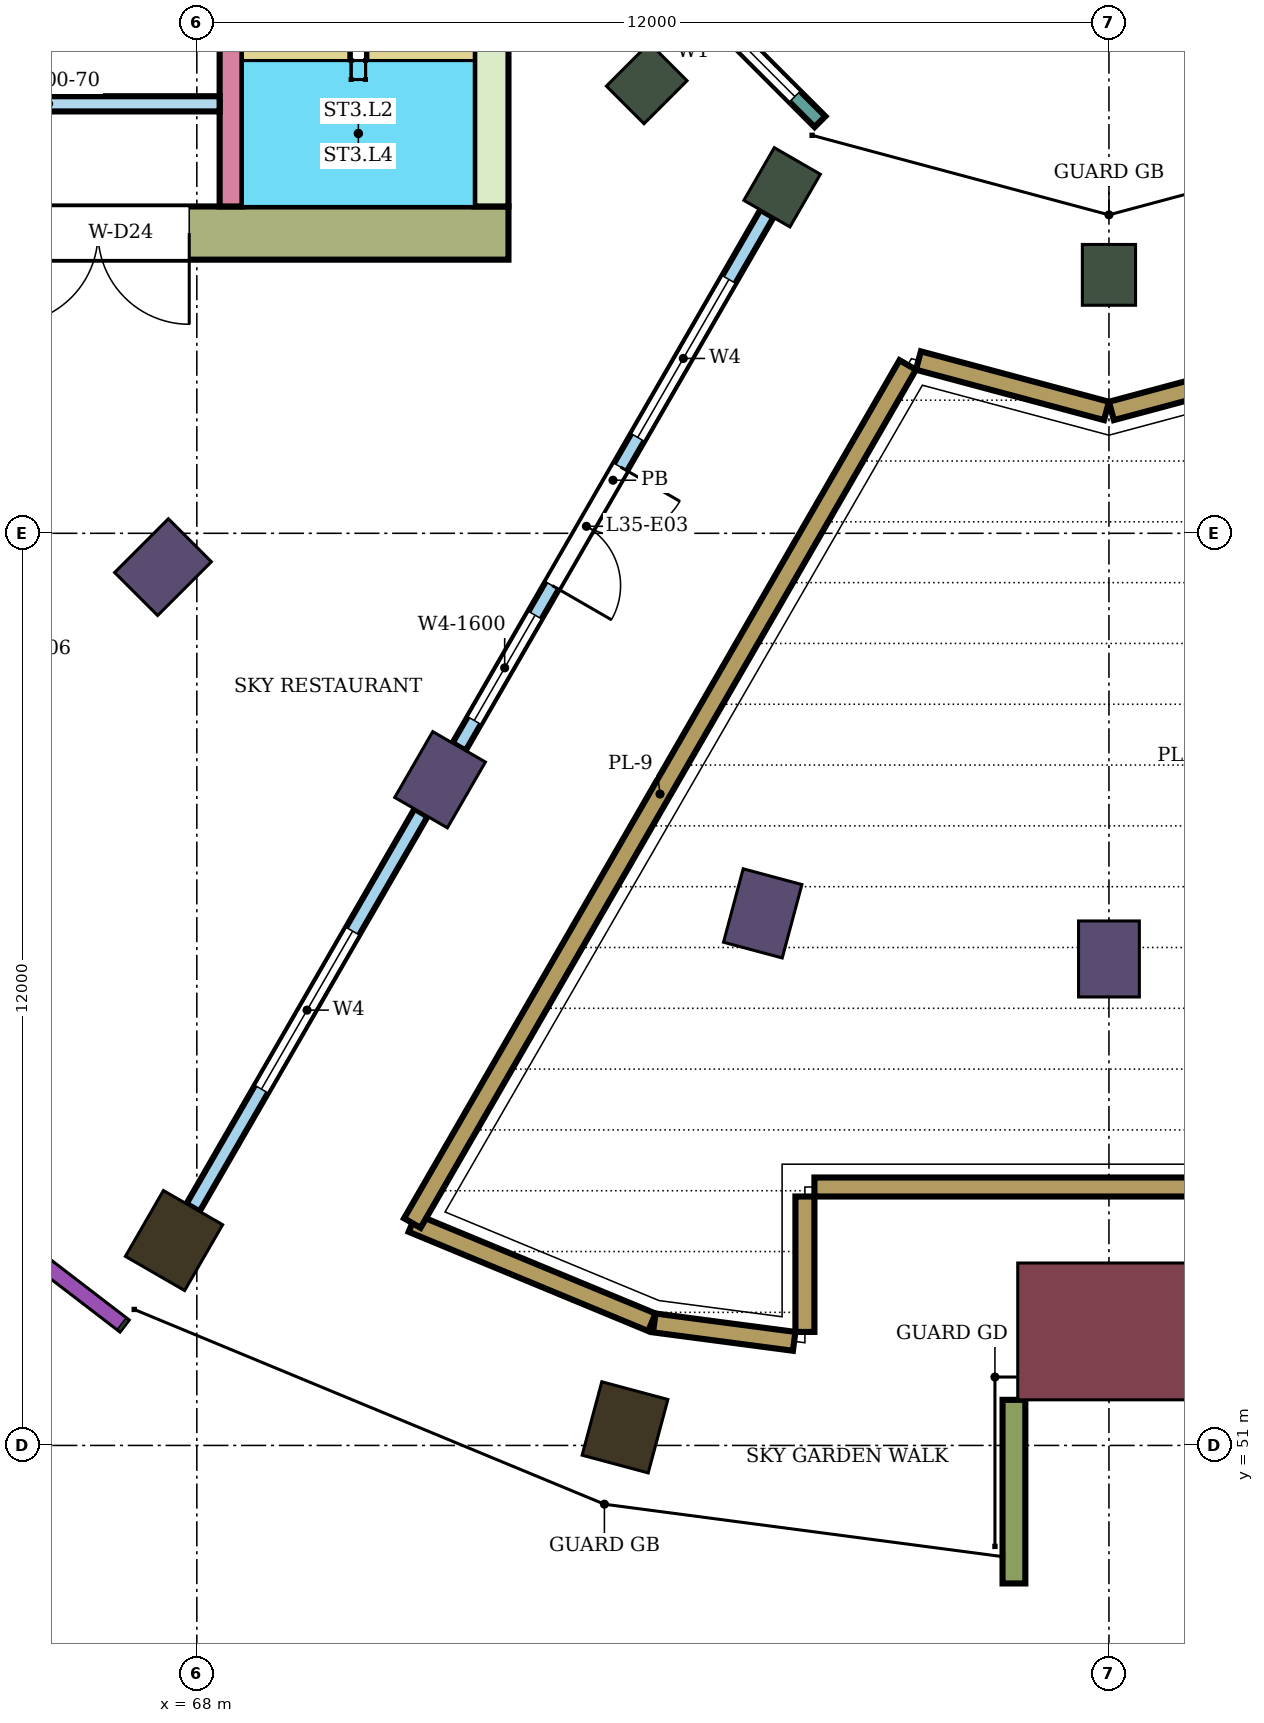
"""IFC4 building model, lengths in metres.
Left out: names, types, materials, properties, quantities, classifications, styles, units other than length and angle.
Written with IfcOpenShell. Run it as: python <this file> out.ifc"""

import sys

from ifc_helpers import new_model, si_unit, direction, frame, frame_2d, origin, origin_2d, place, context, subcontext, project, spatial, rectangle, extrude, element, fill, save


model = new_model("IFC4")
c1 = context("Model", 3, precision=1e-05, world=origin(), true_north=direction((0.0, 1.0)))
c2 = subcontext(c1, "Body", "Model", "MODEL_VIEW")
j1 = project(units=[si_unit("LENGTHUNIT", "METRE"), si_unit("PLANEANGLEUNIT", "RADIAN")], contexts=[c1])
p1 = place(None, origin())
s1 = spatial("IfcSite", under=j1, at=p1, CompositionType="ELEMENT")
p2 = place(p1, origin())
s2 = spatial("IfcBuilding", under=s1, at=p2, CompositionType="ELEMENT")
p3 = place(p2, frame((0.0, 0.0, 149.7)))
s3 = spatial("IfcBuildingStorey", under=s2, at=p3, CompositionType="ELEMENT", Elevation=149.7)
for number, where, z_axis, x_axis in (
    (1, (67.7, 53.696, 0.0), (0.0, 0.0, 1.0), (-0.5, -0.866, 0.0)),
    (2, (73.633, 51.238, 0.0), (0.0, 0.0, 1.0), (-0.259, -0.966, 0.0)),
):
    element("IfcColumn", number, at=place(p3, frame(where, z_axis=z_axis, x_axis=x_axis)), inside=s3, PredefinedType="COLUMN", context=c2, shape_type="SweptSolid", body=[
        extrude(rectangle(XDim=1.0, YDim=0.9, at=origin_2d()), origin(), (0.0, 0.0, 1.0), 8.0),
    ])
for number, where, z_axis, x_axis in (
    (3, (67.555, 62.555, 0.0), (0.0, 0.0, 1.0), (-0.707, -0.707, 0.0)),
    (4, (71.2, 59.758, 0.0), (0.0, 0.0, 1.0), (-0.5, -0.866, 0.0)),
    (5, (75.445, 58.0, 0.0), (0.0, 0.0, 1.0), (-0.259, -0.966, 0.0)),
    (6, (80.0, 57.4, 0.0), (0.0, 0.0, 1.0), (0.0, -1.0, 0.0)),
):
    element("IfcColumn", number, at=place(p3, frame(where, z_axis=z_axis, x_axis=x_axis)), inside=s3, PredefinedType="COLUMN", context=c2, shape_type="SweptSolid", body=[
        extrude(rectangle(XDim=1.0, YDim=0.8, at=origin_2d()), origin(), (0.0, 0.0, 1.0), 8.0),
    ])
for number, where, z_axis, x_axis in (
    (7, (73.919, 68.919, 0.0), (0.0, 0.0, 1.0), (-0.707, -0.707, 0.0)),
    (8, (75.7, 67.552, 0.0), (0.0, 0.0, 1.0), (-0.5, -0.866, 0.0)),
    (9, (80.0, 66.4, 0.0), (0.0, 0.0, 1.0), (0.0, -1.0, 0.0)),
):
    element("IfcColumn", number, at=place(p3, frame(where, z_axis=z_axis, x_axis=x_axis)), inside=s3, PredefinedType="COLUMN", context=c2, shape_type="SweptSolid", body=[
        extrude(rectangle(XDim=0.8, YDim=0.7, at=origin_2d()), origin(), (0.0, 0.0, 1.0), 8.0),
    ])
p4 = place(p3, frame((80.0, 52.5, 0.0), z_axis=(0.0, 0.0, 1.0), x_axis=(0.0, -1.0, 0.0)))
e10 = element("IfcColumn", 10, at=p4, inside=s3, PredefinedType="COLUMN", context=c2, shape_type="SweptSolid", body=[
    extrude(rectangle(XDim=1.8, YDim=2.4, at=origin_2d()), origin(), (0.0, 0.0, 1.0), 8.0),
])
p5 = place(p3, frame((72.1, 66.95, 0.0), z_axis=(0.0, 0.0, 1.0), x_axis=(-1.0, 0.0, 0.0)))
e11 = element("IfcWall", 11, at=p5, inside=s3, PredefinedType="SHEAR", context=c2, shape_type="SweptSolid", body=[
    extrude(rectangle(XDim=14.8, YDim=0.7, at=frame_2d((7.4, 0.0))), origin(), (0.0, 0.0, 1.0), 7.68),
])
p6 = place(p5, frame((4.2, 0.0, 0.0)))
e12 = element("IfcOpeningElement", 12, at=p6, cuts=e11, PredefinedType="OPENING", context=c2, shape_type="SweptSolid", body=[
    extrude(rectangle(XDim=2.4, YDim=2.4, at=frame_2d((1.2, 1.2))), frame((0.0, 0.36, 0.0), z_axis=(0.0, -1.0, 0.0), x_axis=(1.0, 0.0, 0.0)), (0.0, 0.0, 1.0), 0.72),
])
p7 = place(p3, frame((71.875, 75.0, 0.0), z_axis=(0.0, 0.0, 1.0), x_axis=(0.0, -1.0, 0.0)))
e13 = element("IfcWall", 13, at=p7, inside=s3, PredefinedType="SHEAR", context=c2, shape_type="SweptSolid", body=[
    extrude(rectangle(XDim=7.7, YDim=0.45, at=frame_2d((3.85, 0.0))), origin(), (0.0, 0.0, 1.0), 7.68),
])
p8 = place(p3, frame((68.45, 75.0, 0.0), z_axis=(0.0, 0.0, 1.0), x_axis=(0.0, -1.0, 0.0)))
e14 = element("IfcWall", 14, at=p8, inside=s3, PredefinedType="SHEAR", context=c2, shape_type="SweptSolid", body=[
    extrude(rectangle(XDim=7.7, YDim=0.3, at=frame_2d((3.85, 0.0))), origin(), (0.0, 0.0, 1.0), 7.68),
])
p9 = place(p8, frame((1.85, 0.0, 0.0)))
e15 = element("IfcOpeningElement", 15, at=p9, cuts=e14, PredefinedType="OPENING", context=c2, shape_type="SweptSolid", body=[
    extrude(rectangle(XDim=0.9, YDim=2.1, at=frame_2d((0.45, 1.05))), frame((0.0, 0.16, 0.0), z_axis=(0.0, -1.0, 0.0), x_axis=(1.0, 0.0, 0.0)), (0.0, 0.0, 1.0), 0.32),
])
p10 = place(p3, frame((68.3, 68.65, 0.0), z_axis=(0.0, 0.0, 1.0), x_axis=(-1.0, 0.0, 0.0)))
e16 = element("IfcWall", 16, at=p10, inside=s3, PredefinedType="SHEAR", context=c2, shape_type="SweptSolid", body=[
    extrude(rectangle(XDim=4.5, YDim=0.2, at=frame_2d((2.25, 0.0))), origin(), (0.0, 0.0, 1.0), 7.68),
])
p11 = place(p3, frame((78.75, 51.6, 0.0), z_axis=(0.0, 0.0, 1.0), x_axis=(0.0, -1.0, 0.0)))
e17 = element("IfcWall", 17, at=p11, inside=s3, PredefinedType="NOTDEFINED", context=c2, shape_type="SweptSolid", body=[
    extrude(rectangle(XDim=2.416, YDim=0.3, at=frame_2d((1.208, 0.0))), origin(), (0.0, 0.0, 1.0), 8.0),
])
p12 = place(p3, frame((73.415, 71.198, 0.0), z_axis=(0.0, 0.0, 1.0), x_axis=(0.707106781187, -0.707106781187, 0.0)))
e18 = element("IfcWall", 18, at=p12, inside=s3, PredefinedType="NOTDEFINED", context=c2, shape_type="SweptSolid", body=[
    extrude(rectangle(XDim=3.936, YDim=0.2, at=frame_2d((1.968, 0.0))), origin(), (0.0, 0.0, 1.0), 8.0),
])
p13 = place(p12, frame((0.468, 0.0, 0.9)))
e19 = element("IfcOpeningElement", 19, at=p13, cuts=e18, PredefinedType="OPENING", context=c2, shape_type="SweptSolid", body=[
    extrude(rectangle(XDim=3.0, YDim=2.3, at=frame_2d((1.5, 1.15))), frame((0.0, 0.11, 0.0), z_axis=(0.0, -1.0, 0.0), x_axis=(1.0, 0.0, 0.0)), (0.0, 0.0, 1.0), 0.22),
])
p14 = place(p3, frame((70.835, 53.926, 0.0), z_axis=(0.0, 0.0, 1.0), x_axis=(0.923871147788, -0.38270367425, 0.0)))
e20 = element("IfcWall", 20, at=p14, inside=s3, PredefinedType="USERDEFINED", context=c2, shape_type="SweptSolid", body=[
    extrude(rectangle(XDim=3.411, YDim=0.25, at=frame_2d((1.706, 0.0))), origin(), (0.0, 0.0, 1.0), 0.6),
])
p15 = place(p3, frame((74.018, 52.612, 0.0), z_axis=(0.0, 0.0, 1.0), x_axis=(0.991436829887, -0.130587182926, 0.0)))
e21 = element("IfcWall", 21, at=p15, inside=s3, PredefinedType="USERDEFINED", context=c2, shape_type="SweptSolid", body=[
    extrude(rectangle(XDim=1.856, YDim=0.25, at=frame_2d((0.928, 0.0))), origin(), (0.0, 0.0, 1.0), 0.6),
])
p16 = place(p3, frame((76.0, 52.493, 0.0), z_axis=(0.0, 0.0, 1.0), x_axis=(0.0, 1.0, 0.0)))
e22 = element("IfcWall", 22, at=p16, inside=s3, PredefinedType="USERDEFINED", context=c2, shape_type="SweptSolid", body=[
    extrude(rectangle(XDim=1.781, YDim=0.25, at=frame_2d((0.891, 0.0))), origin(), (0.0, 0.0, 1.0), 0.6),
])
p17 = place(p3, frame((76.125, 54.4, 0.0), z_axis=(0.0, 0.0, 1.0), x_axis=(1.0, 0.0, 0.0)))
e23 = element("IfcWall", 23, at=p17, inside=s3, PredefinedType="USERDEFINED", context=c2, shape_type="SweptSolid", body=[
    extrude(rectangle(XDim=7.75, YDim=0.25, at=frame_2d((3.875, 0.0))), origin(), (0.0, 0.0, 1.0), 0.6),
])
for number, where, z_axis, x_axis in (
    (24, (82.507, 65.273, 0.0), (0.0, 0.0, 1.0), (-0.966, -0.259, 0.0)),
    (25, (79.968, 64.61, 0.0), (0.0, 0.0, 1.0), (-0.966, 0.259, 0.0)),
):
    element("IfcWall", number, at=place(p3, frame(where, z_axis=z_axis, x_axis=x_axis)), inside=s3, PredefinedType="USERDEFINED", context=c2, shape_type="SweptSolid", body=[
        extrude(rectangle(XDim=2.562, YDim=0.25, at=frame_2d((1.281, 0.0))), origin(), (0.0, 0.0, 1.0), 0.6),
    ])
p18 = place(p3, frame((77.353, 65.215, 0.0), z_axis=(0.0, 0.0, 1.0), x_axis=(-0.499990498062, -0.866030889661, 0.0)))
e26 = element("IfcWall", 26, at=p18, inside=s3, PredefinedType="USERDEFINED", context=c2, shape_type="SweptSolid", body=[
    extrude(rectangle(XDim=13.035, YDim=0.25, at=frame_2d((6.518, 0.0))), origin(), (0.0, 0.0, 1.0), 0.6),
])
p19 = place(p3, frame((75.5, 67.206, 0.0), z_axis=(0.0, 0.0, 1.0), x_axis=(-0.499999880539, -0.866025472755, 0.0)))
e27 = element("IfcWall", 27, at=p19, inside=s3, PredefinedType="NOTDEFINED", context=c2, shape_type="SweptSolid", body=[
    extrude(rectangle(XDim=8.1, YDim=0.2, at=frame_2d((4.05, 0.0))), origin(), (0.0, 0.0, 1.0), 8.0),
])
p20 = place(p19, frame((1.0, 0.0, 0.3)))
e28 = element("IfcOpeningElement", 28, at=p20, cuts=e27, PredefinedType="OPENING", context=c2, shape_type="SweptSolid", body=[
    extrude(rectangle(XDim=2.4, YDim=3.6, at=frame_2d((1.2, 1.8))), frame((0.0, 0.11, 0.0), z_axis=(0.0, -1.0, 0.0), x_axis=(1.0, 0.0, 0.0)), (0.0, 0.0, 1.0), 0.22),
])
p21 = place(p19, frame((3.85, 0.0, 0.0)))
e29 = element("IfcOpeningElement", 29, at=p21, cuts=e27, PredefinedType="OPENING", context=c2, shape_type="SweptSolid", body=[
    extrude(rectangle(XDim=1.8, YDim=2.4, at=frame_2d((0.9, 1.2))), frame((0.0, 0.11, 0.0), z_axis=(0.0, -1.0, 0.0), x_axis=(1.0, 0.0, 0.0)), (0.0, 0.0, 1.0), 0.22),
])
p22 = place(p19, frame((6.1, 0.0, 0.3)))
e30 = element("IfcOpeningElement", 30, at=p22, cuts=e27, PredefinedType="OPENING", context=c2, shape_type="SweptSolid", body=[
    extrude(rectangle(XDim=1.6, YDim=3.6, at=frame_2d((0.8, 1.8))), frame((0.0, 0.11, 0.0), z_axis=(0.0, -1.0, 0.0), x_axis=(1.0, 0.0, 0.0)), (0.0, 0.0, 1.0), 0.22),
])
p23 = place(p3, frame((70.95, 59.325, 0.0), z_axis=(0.0, 0.0, 1.0), x_axis=(-0.500007758305, -0.866020924479, 0.0)))
e31 = element("IfcWall", 31, at=p23, inside=s3, PredefinedType="NOTDEFINED", context=c2, shape_type="SweptSolid", body=[
    extrude(rectangle(XDim=6.0, YDim=0.2, at=frame_2d((3.0, 0.0))), origin(), (0.0, 0.0, 1.0), 8.0),
])
p24 = place(p23, frame((1.8, 0.0, 0.3)))
e32 = element("IfcOpeningElement", 32, at=p24, cuts=e31, PredefinedType="OPENING", context=c2, shape_type="SweptSolid", body=[
    extrude(rectangle(XDim=2.4, YDim=3.6, at=frame_2d((1.2, 1.8))), frame((0.0, 0.11, 0.0), z_axis=(0.0, -1.0, 0.0), x_axis=(1.0, 0.0, 0.0)), (0.0, 0.0, 1.0), 0.22),
])
p25 = place(p13, origin())
e33 = element("IfcWindow", 33, at=p25, inside=s3, PartitioningType="SINGLE_PANEL", PredefinedType="WINDOW", context=c2, shape_type="SweptSolid", body=[
    extrude(rectangle(XDim=3.0, YDim=2.3, at=frame_2d((1.5, 1.15))), frame((0.0, 0.03, 0.0), z_axis=(0.0, -1.0, 0.0), x_axis=(1.0, 0.0, 0.0)), (0.0, 0.0, 1.0), 0.06),
])
fill(e19, e33)
p26 = place(p20, origin())
e34 = element("IfcWindow", 34, at=p26, inside=s3, PartitioningType="SINGLE_PANEL", PredefinedType="WINDOW", context=c2, shape_type="SweptSolid", body=[
    extrude(rectangle(XDim=2.4, YDim=3.6, at=frame_2d((1.2, 1.8))), frame((0.0, 0.03, 0.0), z_axis=(0.0, -1.0, 0.0), x_axis=(1.0, 0.0, 0.0)), (0.0, 0.0, 1.0), 0.06),
])
fill(e28, e34)
p27 = place(p21, origin())
e35 = element("IfcDoor", 35, at=p27, inside=s3, OperationType="DOUBLE_DOOR_SINGLE_SWING", PredefinedType="DOOR", context=c2, shape_type="SweptSolid", body=[
    extrude(rectangle(XDim=1.8, YDim=2.4, at=frame_2d((0.9, 1.2))), frame((0.0, 0.025, 0.0), z_axis=(0.0, -1.0, 0.0), x_axis=(1.0, 0.0, 0.0)), (0.0, 0.0, 1.0), 0.05),
])
fill(e29, e35)
p28 = place(p22, origin())
e36 = element("IfcWindow", 36, at=p28, inside=s3, PartitioningType="SINGLE_PANEL", PredefinedType="WINDOW", context=c2, shape_type="SweptSolid", body=[
    extrude(rectangle(XDim=1.6, YDim=3.6, at=frame_2d((0.8, 1.8))), frame((0.0, 0.03, 0.0), z_axis=(0.0, -1.0, 0.0), x_axis=(1.0, 0.0, 0.0)), (0.0, 0.0, 1.0), 0.06),
])
fill(e30, e36)
p29 = place(p24, origin())
e37 = element("IfcWindow", 37, at=p29, inside=s3, PartitioningType="SINGLE_PANEL", PredefinedType="WINDOW", context=c2, shape_type="SweptSolid", body=[
    extrude(rectangle(XDim=2.4, YDim=3.6, at=frame_2d((1.2, 1.8))), frame((0.0, 0.03, 0.0), z_axis=(0.0, -1.0, 0.0), x_axis=(1.0, 0.0, 0.0)), (0.0, 0.0, 1.0), 0.06),
])
fill(e32, e37)
p30 = place(p6, origin())
e38 = element("IfcDoor", 38, at=p30, inside=s3, OperationType="DOUBLE_DOOR_SINGLE_SWING", PredefinedType="DOOR", context=c2, shape_type="SweptSolid", body=[
    extrude(rectangle(XDim=2.4, YDim=2.4, at=frame_2d((1.2, 1.2))), frame((0.0, 0.025, 0.0), z_axis=(0.0, -1.0, 0.0), x_axis=(1.0, 0.0, 0.0)), (0.0, 0.0, 1.0), 0.05),
])
fill(e12, e38)
save(model, sys.argv[1])
